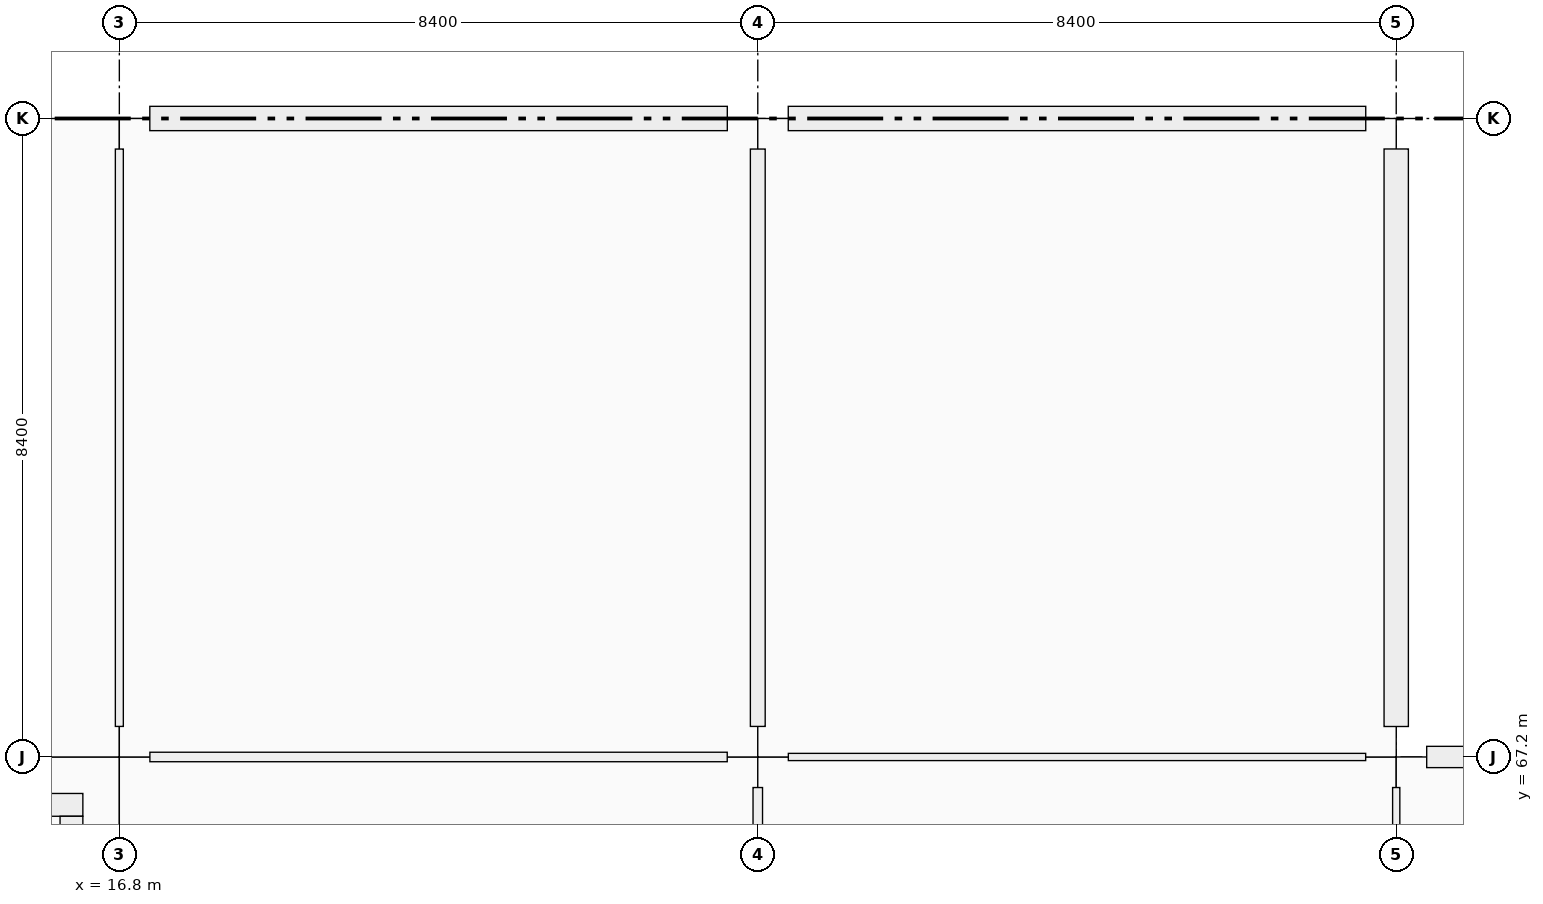
"""IFC4 building model, lengths in metres.
Left out: names, types, materials, properties, quantities, classifications, styles, units other than length and angle.
Written with IfcOpenShell. Run it as: python <this file> out.ifc"""

import sys

from ifc_helpers import new_model, si_unit, direction, frame, frame_2d, origin, origin_2d, place, context, subcontext, project, spatial, rectangle, extrude, element, fill, save


model = new_model("IFC4")
c1 = context("Model", 3, precision=1e-05, world=origin(), true_north=direction((0.0, 1.0)))
c2 = subcontext(c1, "Body", "Model", "MODEL_VIEW")
j1 = project(units=[si_unit("LENGTHUNIT", "METRE"), si_unit("PLANEANGLEUNIT", "RADIAN")], contexts=[c1])
p1 = place(None, origin())
s1 = spatial("IfcSite", under=j1, at=p1, CompositionType="ELEMENT")
p2 = place(p1, origin())
s2 = spatial("IfcBuilding", under=s1, at=p2, CompositionType="ELEMENT")
p3 = place(p2, frame((0.0, 0.0, 5.76)))
s3 = spatial("IfcBuildingStorey", under=s2, at=p3, CompositionType="ELEMENT", Elevation=5.76)
for number, where, z_axis, x_axis in (
    (1, (16.8, 67.2, 0.0), (0.0, 0.0, 1.0), (1.0, 0.0, 0.0)),
    (2, (16.8, 75.6, 0.0), (0.0, 0.0, 1.0), (1.0, 0.0, 0.0)),
    (3, (25.2, 67.2, 0.0), (0.0, 0.0, 1.0), (1.0, 0.0, 0.0)),
    (4, (25.2, 75.6, 0.0), (0.0, 0.0, 1.0), (1.0, 0.0, 0.0)),
    (5, (33.6, 67.2, 0.0), (0.0, 0.0, 1.0), (1.0, 0.0, 0.0)),
    (6, (33.6, 75.6, 0.0), (0.0, 0.0, 1.0), (1.0, 0.0, 0.0)),
):
    element("IfcColumn", number, at=place(p3, frame(where, z_axis=z_axis, x_axis=x_axis)), inside=s3, PredefinedType="COLUMN", context=c2, shape_type="SweptSolid", body=[
        extrude(rectangle(XDim=0.8, YDim=0.8, at=origin_2d()), origin(), (0.0, 0.0, 1.0), 4.5),
    ])
p4 = place(p3, frame((17.201, 75.6, 0.0), z_axis=(0.0, 0.0, 1.0), x_axis=(1.0, 0.0, 0.0)))
e7 = element("IfcWall", 7, at=p4, inside=s3, PredefinedType="SOLIDWALL", context=c2, shape_type="SweptSolid", body=[
    extrude(rectangle(XDim=7.598, YDim=0.32, at=frame_2d((3.799, 0.0))), origin(), (0.0, 0.0, 1.0), 3.4),
])
p5 = place(p4, frame((3.049, 0.0, 0.9)))
e8 = element("IfcOpeningElement", 8, at=p5, cuts=e7, PredefinedType="OPENING", context=c2, shape_type="SweptSolid", body=[
    extrude(rectangle(XDim=1.5, YDim=1.2, at=frame_2d((0.75, 0.6))), frame((0.0, 0.16, 0.0), z_axis=(0.0, -1.0, 0.0), x_axis=(1.0, 0.0, 0.0)), (0.0, 0.0, 1.0), 0.32),
])
p6 = place(p3, frame((25.601, 75.6, 0.0), z_axis=(0.0, 0.0, 1.0), x_axis=(1.0, 0.0, 0.0)))
e9 = element("IfcWall", 9, at=p6, inside=s3, PredefinedType="SOLIDWALL", context=c2, shape_type="SweptSolid", body=[
    extrude(rectangle(XDim=7.598, YDim=0.32, at=frame_2d((3.799, 0.0))), origin(), (0.0, 0.0, 1.0), 3.4),
])
p7 = place(p6, frame((2.724, 0.0, 0.9)))
e10 = element("IfcOpeningElement", 10, at=p7, cuts=e9, PredefinedType="OPENING", context=c2, shape_type="SweptSolid", body=[
    extrude(rectangle(XDim=2.15, YDim=1.95, at=frame_2d((1.075, 0.975))), frame((0.0, 0.16, 0.0), z_axis=(0.0, -1.0, 0.0), x_axis=(1.0, 0.0, 0.0)), (0.0, 0.0, 1.0), 0.32),
])
p8 = place(p3, frame((33.6, 75.199, 0.0), z_axis=(0.0, 0.0, 1.0), x_axis=(0.0, -1.0, 0.0)))
e11 = element("IfcWall", 11, at=p8, inside=s3, PredefinedType="SOLIDWALL", context=c2, shape_type="SweptSolid", body=[
    extrude(rectangle(XDim=7.598, YDim=0.32, at=frame_2d((3.799, 0.0))), origin(), (0.0, 0.0, 1.0), 3.4),
])
p9 = place(p8, frame((2.524, 0.0, 0.9)))
e12 = element("IfcOpeningElement", 12, at=p9, cuts=e11, PredefinedType="OPENING", context=c2, shape_type="SweptSolid", body=[
    extrude(rectangle(XDim=2.55, YDim=1.95, at=frame_2d((1.275, 0.975))), frame((0.0, 0.16, 0.0), z_axis=(0.0, -1.0, 0.0), x_axis=(1.0, 0.0, 0.0)), (0.0, 0.0, 1.0), 0.32),
])
p10 = place(p3, frame((34.001, 67.2, 0.0), z_axis=(0.0, 0.0, 1.0), x_axis=(1.0, 0.0, 0.0)))
e13 = element("IfcWall", 13, at=p10, inside=s3, PredefinedType="SOLIDWALL", context=c2, shape_type="SweptSolid", body=[
    extrude(rectangle(XDim=7.598, YDim=0.28, at=frame_2d((3.799, 0.0))), origin(), (0.0, 0.0, 1.0), 3.4),
])
p11 = place(p10, frame((3.149, 0.0, 0.9)))
e14 = element("IfcOpeningElement", 14, at=p11, cuts=e13, PredefinedType="OPENING", context=c2, shape_type="SweptSolid", body=[
    extrude(rectangle(XDim=1.3, YDim=1.95, at=frame_2d((0.65, 0.975))), frame((0.0, 0.14, 0.0), z_axis=(0.0, -1.0, 0.0), x_axis=(1.0, 0.0, 0.0)), (0.0, 0.0, 1.0), 0.28),
])
p12 = place(p3, frame((8.88, 66.57, 0.0), z_axis=(0.0, 0.0, 1.0), x_axis=(1.0, 0.0, 0.0)))
e15 = element("IfcWall", 15, at=p12, inside=s3, PredefinedType="SHEAR", context=c2, shape_type="SweptSolid", body=[
    extrude(rectangle(XDim=7.44, YDim=0.3, at=frame_2d((3.72, 0.0))), origin(), (0.0, 0.0, 1.0), 4.5),
])
p13 = place(p3, frame((16.17, 66.42, 0.0), z_axis=(0.0, 0.0, 1.0), x_axis=(0.0, -1.0, 0.0)))
e16 = element("IfcWall", 16, at=p13, inside=s3, PredefinedType="SHEAR", context=c2, shape_type="SweptSolid", body=[
    extrude(rectangle(XDim=6.84, YDim=0.3, at=frame_2d((3.42, 0.0))), origin(), (0.0, 0.0, 1.0), 4.5),
])
p14 = place(p3, frame((17.202, 67.2, 0.0), z_axis=(0.0, 0.0, 1.0), x_axis=(1.0, 0.0, 0.0)))
e17 = element("IfcWall", 17, at=p14, inside=s3, PredefinedType="PARTITIONING", context=c2, shape_type="SweptSolid", body=[
    extrude(rectangle(XDim=7.596, YDim=0.125, at=frame_2d((3.798, 0.0))), origin(), (0.0, 0.0, 1.0), 2.4),
])
p15 = place(p14, frame((3.273, 0.0, 0.0)))
e18 = element("IfcOpeningElement", 18, at=p15, cuts=e17, PredefinedType="OPENING", context=c2, shape_type="SweptSolid", body=[
    extrude(rectangle(XDim=1.05, YDim=2.12, at=frame_2d((0.525, 1.06))), frame((0.0, 0.062, 0.0), z_axis=(0.0, -1.0, 0.0), x_axis=(1.0, 0.0, 0.0)), (0.0, 0.0, 1.0), 0.125),
])
p16 = place(p3, frame((25.602, 67.2, 0.0), z_axis=(0.0, 0.0, 1.0), x_axis=(1.0, 0.0, 0.0)))
e19 = element("IfcWall", 19, at=p16, inside=s3, PredefinedType="PARTITIONING", context=c2, shape_type="SweptSolid", body=[
    extrude(rectangle(XDim=7.596, YDim=0.095, at=frame_2d((3.798, 0.0))), origin(), (0.0, 0.0, 1.0), 2.4),
])
p17 = place(p16, frame((3.258, 0.0, 0.0)))
e20 = element("IfcOpeningElement", 20, at=p17, cuts=e19, PredefinedType="OPENING", context=c2, shape_type="SweptSolid", body=[
    extrude(rectangle(XDim=1.08, YDim=2.22, at=frame_2d((0.54, 1.11))), frame((0.0, 0.047, 0.0), z_axis=(0.0, -1.0, 0.0), x_axis=(1.0, 0.0, 0.0)), (0.0, 0.0, 1.0), 0.095),
])
p18 = place(p3, frame((16.8, 67.602, 0.0), z_axis=(0.0, 0.0, 1.0), x_axis=(0.0, 1.0, 0.0)))
e21 = element("IfcWall", 21, at=p18, inside=s3, PredefinedType="PARTITIONING", context=c2, shape_type="SweptSolid", body=[
    extrude(rectangle(XDim=7.596, YDim=0.105, at=frame_2d((3.798, 0.0))), origin(), (0.0, 0.0, 1.0), 2.4),
])
p19 = place(p18, frame((3.313, 0.0, 0.0)))
e22 = element("IfcOpeningElement", 22, at=p19, cuts=e21, PredefinedType="OPENING", context=c2, shape_type="SweptSolid", body=[
    extrude(rectangle(XDim=0.97, YDim=2.12, at=frame_2d((0.485, 1.06))), frame((0.0, 0.052, 0.0), z_axis=(0.0, -1.0, 0.0), x_axis=(1.0, 0.0, 0.0)), (0.0, 0.0, 1.0), 0.105),
])
p20 = place(p3, frame((25.2, 59.202, 0.0), z_axis=(0.0, 0.0, 1.0), x_axis=(0.0, 1.0, 0.0)))
e23 = element("IfcWall", 23, at=p20, inside=s3, PredefinedType="PARTITIONING", context=c2, shape_type="SweptSolid", body=[
    extrude(rectangle(XDim=7.596, YDim=0.125, at=frame_2d((3.798, 0.0))), origin(), (0.0, 0.0, 1.0), 2.4),
])
p21 = place(p20, frame((3.298, 0.0, 0.0)))
e24 = element("IfcOpeningElement", 24, at=p21, cuts=e23, PredefinedType="OPENING", context=c2, shape_type="SweptSolid", body=[
    extrude(rectangle(XDim=1.0, YDim=2.2, at=frame_2d((0.5, 1.1))), frame((0.0, 0.062, 0.0), z_axis=(0.0, -1.0, 0.0), x_axis=(1.0, 0.0, 0.0)), (0.0, 0.0, 1.0), 0.125),
])
p22 = place(p3, frame((25.2, 67.602, 0.0), z_axis=(0.0, 0.0, 1.0), x_axis=(0.0, 1.0, 0.0)))
e25 = element("IfcWall", 25, at=p22, inside=s3, PredefinedType="PARTITIONING", context=c2, shape_type="SweptSolid", body=[
    extrude(rectangle(XDim=7.596, YDim=0.195, at=frame_2d((3.798, 0.0))), origin(), (0.0, 0.0, 1.0), 2.4),
])
p23 = place(p22, frame((3.288, 0.0, 0.0)))
e26 = element("IfcOpeningElement", 26, at=p23, cuts=e25, PredefinedType="OPENING", context=c2, shape_type="SweptSolid", body=[
    extrude(rectangle(XDim=1.02, YDim=2.2, at=frame_2d((0.51, 1.1))), frame((0.0, 0.098, 0.0), z_axis=(0.0, -1.0, 0.0), x_axis=(1.0, 0.0, 0.0)), (0.0, 0.0, 1.0), 0.195),
])
p24 = place(p3, frame((33.6, 59.202, 0.0), z_axis=(0.0, 0.0, 1.0), x_axis=(0.0, 1.0, 0.0)))
e27 = element("IfcWall", 27, at=p24, inside=s3, PredefinedType="PARTITIONING", context=c2, shape_type="SweptSolid", body=[
    extrude(rectangle(XDim=7.596, YDim=0.095, at=frame_2d((3.798, 0.0))), origin(), (0.0, 0.0, 1.0), 2.4),
])
p25 = place(p24, frame((3.308, 0.0, 0.0)))
e28 = element("IfcOpeningElement", 28, at=p25, cuts=e27, PredefinedType="OPENING", context=c2, shape_type="SweptSolid", body=[
    extrude(rectangle(XDim=0.98, YDim=2.18, at=frame_2d((0.49, 1.09))), frame((0.0, 0.047, 0.0), z_axis=(0.0, -1.0, 0.0), x_axis=(1.0, 0.0, 0.0)), (0.0, 0.0, 1.0), 0.095),
])
p26 = place(p5, origin())
e29 = element("IfcWindow", 29, at=p26, inside=s3, PartitioningType="SINGLE_PANEL", PredefinedType="WINDOW", context=c2, shape_type="SweptSolid", body=[
    extrude(rectangle(XDim=1.5, YDim=1.2, at=frame_2d((0.75, 0.6))), frame((0.0, 0.03, 0.0), z_axis=(0.0, -1.0, 0.0), x_axis=(1.0, 0.0, 0.0)), (0.0, 0.0, 1.0), 0.06),
])
fill(e8, e29)
p27 = place(p7, origin())
e30 = element("IfcWindow", 30, at=p27, inside=s3, PartitioningType="SINGLE_PANEL", PredefinedType="WINDOW", context=c2, shape_type="SweptSolid", body=[
    extrude(rectangle(XDim=2.15, YDim=1.95, at=frame_2d((1.075, 0.975))), frame((0.0, 0.03, 0.0), z_axis=(0.0, -1.0, 0.0), x_axis=(1.0, 0.0, 0.0)), (0.0, 0.0, 1.0), 0.06),
])
fill(e10, e30)
p28 = place(p9, origin())
e31 = element("IfcWindow", 31, at=p28, inside=s3, PartitioningType="SINGLE_PANEL", PredefinedType="WINDOW", context=c2, shape_type="SweptSolid", body=[
    extrude(rectangle(XDim=2.55, YDim=1.95, at=frame_2d((1.275, 0.975))), frame((0.0, 0.03, 0.0), z_axis=(0.0, -1.0, 0.0), x_axis=(1.0, 0.0, 0.0)), (0.0, 0.0, 1.0), 0.06),
])
fill(e12, e31)
p29 = place(p15, origin())
e32 = element("IfcDoor", 32, at=p29, inside=s3, OperationType="SINGLE_SWING_LEFT", PredefinedType="DOOR", context=c2, shape_type="SweptSolid", body=[
    extrude(rectangle(XDim=1.05, YDim=2.12, at=frame_2d((0.525, 1.06))), frame((0.0, 0.025, 0.0), z_axis=(0.0, -1.0, 0.0), x_axis=(1.0, 0.0, 0.0)), (0.0, 0.0, 1.0), 0.05),
])
fill(e18, e32)
p30 = place(p17, origin())
e33 = element("IfcDoor", 33, at=p30, inside=s3, OperationType="SINGLE_SWING_RIGHT", PredefinedType="DOOR", context=c2, shape_type="SweptSolid", body=[
    extrude(rectangle(XDim=1.08, YDim=2.22, at=frame_2d((0.54, 1.11))), frame((0.0, 0.025, 0.0), z_axis=(0.0, -1.0, 0.0), x_axis=(1.0, 0.0, 0.0)), (0.0, 0.0, 1.0), 0.05),
])
fill(e20, e33)
p31 = place(p19, origin())
e34 = element("IfcDoor", 34, at=p31, inside=s3, OperationType="SINGLE_SWING_RIGHT", PredefinedType="DOOR", context=c2, shape_type="SweptSolid", body=[
    extrude(rectangle(XDim=0.97, YDim=2.12, at=frame_2d((0.485, 1.06))), frame((0.0, 0.025, 0.0), z_axis=(0.0, -1.0, 0.0), x_axis=(1.0, 0.0, 0.0)), (0.0, 0.0, 1.0), 0.05),
])
fill(e22, e34)
p32 = place(p23, origin())
e35 = element("IfcDoor", 35, at=p32, inside=s3, OperationType="SINGLE_SWING_LEFT", PredefinedType="DOOR", context=c2, shape_type="SweptSolid", body=[
    extrude(rectangle(XDim=1.02, YDim=2.2, at=frame_2d((0.51, 1.1))), frame((0.0, 0.025, 0.0), z_axis=(0.0, -1.0, 0.0), x_axis=(1.0, 0.0, 0.0)), (0.0, 0.0, 1.0), 0.05),
])
fill(e26, e35)
save(model, sys.argv[1])
